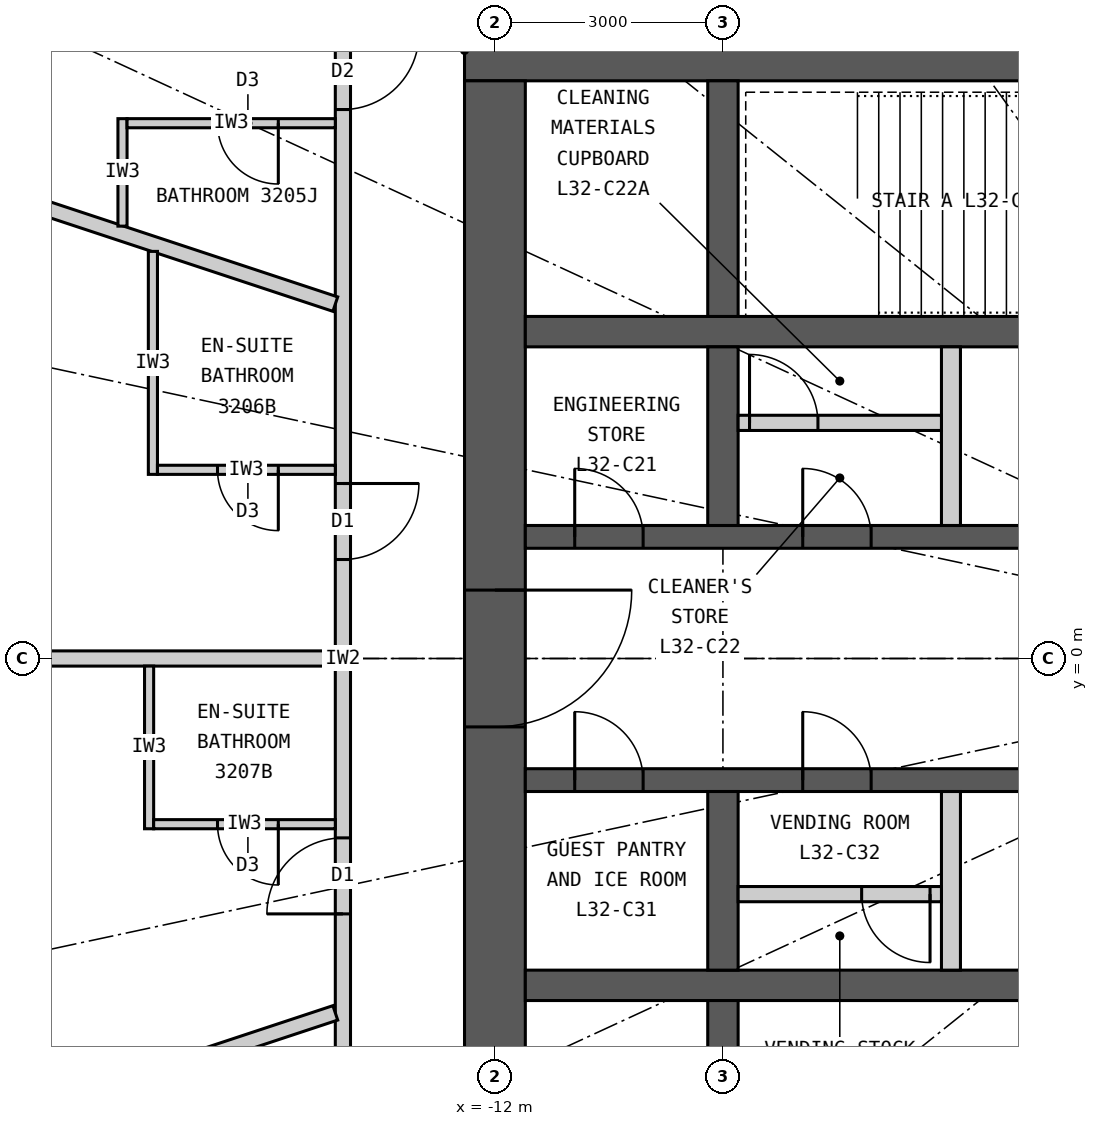
"""IFC4 building model, lengths in metres.
Left out: names, types, materials, properties, quantities, classifications, styles, units other than length and angle.
Written with IfcOpenShell. Run it as: python <this file> out.ifc"""

import sys

from ifc_helpers import new_model, si_unit, direction, frame, frame_2d, origin, place, context, subcontext, project, spatial, rectangle, extrude, element, fill, save


model = new_model("IFC4")
c1 = context("Model", 3, precision=1e-05, world=origin(), true_north=direction((0.0, 1.0)))
c2 = subcontext(c1, "Body", "Model", "MODEL_VIEW")
j1 = project(units=[si_unit("LENGTHUNIT", "METRE"), si_unit("PLANEANGLEUNIT", "RADIAN")], contexts=[c1])
p1 = place(None, origin())
s1 = spatial("IfcSite", under=j1, at=p1, CompositionType="ELEMENT")
p2 = place(p1, origin())
s2 = spatial("IfcBuilding", under=s1, at=p2, CompositionType="ELEMENT")
p3 = place(p2, frame((0.0, 0.0, 125.4)))
s3 = spatial("IfcBuildingStorey", under=s2, at=p3, CompositionType="ELEMENT", Elevation=125.4)
p4 = place(p3, frame((-12.4, 8.0, 0.0), z_axis=(0.0, 0.0, 1.0), x_axis=(1.0, 0.0, 0.0)))
e1 = element("IfcWall", 1, at=p4, inside=s3, PredefinedType="SHEAR", context=c2, shape_type="SweptSolid", body=[
    extrude(rectangle(XDim=24.8, YDim=0.8, at=frame_2d((12.4, 0.0))), origin(), (0.0, 0.0, 1.0), 3.3),
])
p5 = place(p4, frame((11.1, 0.0, 0.0)))
e2 = element("IfcOpeningElement", 2, at=p5, cuts=e1, PredefinedType="OPENING", context=c2, shape_type="SweptSolid", body=[
    extrude(rectangle(XDim=1.2, YDim=2.2, at=frame_2d((0.6, 1.1))), frame((0.0, 0.41, 0.0), z_axis=(0.0, -1.0, 0.0), x_axis=(1.0, 0.0, 0.0)), (0.0, 0.0, 1.0), 0.82),
])
p6 = place(p4, frame((18.7, 0.0, 0.0)))
e3 = element("IfcOpeningElement", 3, at=p6, cuts=e1, PredefinedType="OPENING", context=c2, shape_type="SweptSolid", body=[
    extrude(rectangle(XDim=0.9, YDim=2.2, at=frame_2d((0.45, 1.1))), frame((0.0, 0.41, 0.0), z_axis=(0.0, -1.0, 0.0), x_axis=(1.0, 0.0, 0.0)), (0.0, 0.0, 1.0), 0.82),
])
p7 = place(p3, frame((-12.0, 7.6, 0.0), z_axis=(0.0, 0.0, 1.0), x_axis=(0.0, -1.0, 0.0)))
e4 = element("IfcWall", 4, at=p7, inside=s3, PredefinedType="SHEAR", context=c2, shape_type="SweptSolid", body=[
    extrude(rectangle(XDim=15.2, YDim=0.8, at=frame_2d((7.6, 0.0))), origin(), (0.0, 0.0, 1.0), 3.3),
])
p8 = place(p7, frame((6.7, 0.0, 0.0)))
e5 = element("IfcOpeningElement", 5, at=p8, cuts=e4, PredefinedType="OPENING", context=c2, shape_type="SweptSolid", body=[
    extrude(rectangle(XDim=1.8, YDim=2.2, at=frame_2d((0.9, 1.1))), frame((0.0, 0.41, 0.0), z_axis=(0.0, -1.0, 0.0), x_axis=(1.0, 0.0, 0.0)), (0.0, 0.0, 1.0), 0.82),
])
p9 = place(p3, frame((-11.6, 4.3, 0.0), z_axis=(0.0, 0.0, 1.0), x_axis=(1.0, 0.0, 0.0)))
e6 = element("IfcWall", 6, at=p9, inside=s3, PredefinedType="SHEAR", context=c2, shape_type="SweptSolid", body=[
    extrude(rectangle(XDim=23.2, YDim=0.4, at=frame_2d((11.6, 0.0))), origin(), (0.0, 0.0, 1.0), 3.3),
])
p10 = place(p3, frame((-11.6, 1.6, 0.0), z_axis=(0.0, 0.0, 1.0), x_axis=(1.0, 0.0, 0.0)))
e7 = element("IfcWall", 7, at=p10, inside=s3, PredefinedType="SHEAR", context=c2, shape_type="SweptSolid", body=[
    extrude(rectangle(XDim=23.2, YDim=0.3, at=frame_2d((11.6, 0.0))), origin(), (0.0, 0.0, 1.0), 3.3),
])
p11 = place(p10, frame((6.55, 0.0, 0.0)))
e8 = element("IfcOpeningElement", 8, at=p11, cuts=e7, PredefinedType="OPENING", context=c2, shape_type="SweptSolid", body=[
    extrude(rectangle(XDim=1.1, YDim=2.2, at=frame_2d((0.55, 1.1))), frame((0.0, 0.16, 0.0), z_axis=(0.0, -1.0, 0.0), x_axis=(1.0, 0.0, 0.0)), (0.0, 0.0, 1.0), 0.32),
])
p12 = place(p10, frame((0.65, 0.0, 0.0)))
e9 = element("IfcOpeningElement", 9, at=p12, cuts=e7, PredefinedType="OPENING", context=c2, shape_type="SweptSolid", body=[
    extrude(rectangle(XDim=0.9, YDim=2.2, at=frame_2d((0.45, 1.1))), frame((0.0, 0.16, 0.0), z_axis=(0.0, -1.0, 0.0), x_axis=(1.0, 0.0, 0.0)), (0.0, 0.0, 1.0), 0.32),
])
p13 = place(p10, frame((3.65, 0.0, 0.0)))
e10 = element("IfcOpeningElement", 10, at=p13, cuts=e7, PredefinedType="OPENING", context=c2, shape_type="SweptSolid", body=[
    extrude(rectangle(XDim=0.9, YDim=2.2, at=frame_2d((0.45, 1.1))), frame((0.0, 0.16, 0.0), z_axis=(0.0, -1.0, 0.0), x_axis=(1.0, 0.0, 0.0)), (0.0, 0.0, 1.0), 0.32),
])
p14 = place(p10, frame((21.65, 0.0, 0.0)))
e11 = element("IfcOpeningElement", 11, at=p14, cuts=e7, PredefinedType="OPENING", context=c2, shape_type="SweptSolid", body=[
    extrude(rectangle(XDim=0.9, YDim=2.2, at=frame_2d((0.45, 1.1))), frame((0.0, 0.16, 0.0), z_axis=(0.0, -1.0, 0.0), x_axis=(1.0, 0.0, 0.0)), (0.0, 0.0, 1.0), 0.32),
])
p15 = place(p3, frame((-11.6, -4.3, 0.0), z_axis=(0.0, 0.0, 1.0), x_axis=(1.0, 0.0, 0.0)))
e12 = element("IfcWall", 12, at=p15, inside=s3, PredefinedType="SHEAR", context=c2, shape_type="SweptSolid", body=[
    extrude(rectangle(XDim=23.2, YDim=0.4, at=frame_2d((11.6, 0.0))), origin(), (0.0, 0.0, 1.0), 3.3),
])
p16 = place(p3, frame((-11.6, -1.6, 0.0), z_axis=(0.0, 0.0, 1.0), x_axis=(1.0, 0.0, 0.0)))
e13 = element("IfcWall", 13, at=p16, inside=s3, PredefinedType="SHEAR", context=c2, shape_type="SweptSolid", body=[
    extrude(rectangle(XDim=23.2, YDim=0.3, at=frame_2d((11.6, 0.0))), origin(), (0.0, 0.0, 1.0), 3.3),
])
p17 = place(p16, frame((6.55, 0.0, 0.0)))
e14 = element("IfcOpeningElement", 14, at=p17, cuts=e13, PredefinedType="OPENING", context=c2, shape_type="SweptSolid", body=[
    extrude(rectangle(XDim=1.1, YDim=2.2, at=frame_2d((0.55, 1.1))), frame((0.0, 0.16, 0.0), z_axis=(0.0, -1.0, 0.0), x_axis=(1.0, 0.0, 0.0)), (0.0, 0.0, 1.0), 0.32),
])
p18 = place(p16, frame((15.3, 0.0, 0.0)))
e15 = element("IfcOpeningElement", 15, at=p18, cuts=e13, PredefinedType="OPENING", context=c2, shape_type="SweptSolid", body=[
    extrude(rectangle(XDim=1.6, YDim=2.4, at=frame_2d((0.8, 1.2))), frame((0.0, 0.16, 0.0), z_axis=(0.0, -1.0, 0.0), x_axis=(1.0, 0.0, 0.0)), (0.0, 0.0, 1.0), 0.32),
])
p19 = place(p16, frame((0.65, 0.0, 0.0)))
e16 = element("IfcOpeningElement", 16, at=p19, cuts=e13, PredefinedType="OPENING", context=c2, shape_type="SweptSolid", body=[
    extrude(rectangle(XDim=0.9, YDim=2.2, at=frame_2d((0.45, 1.1))), frame((0.0, 0.16, 0.0), z_axis=(0.0, -1.0, 0.0), x_axis=(1.0, 0.0, 0.0)), (0.0, 0.0, 1.0), 0.32),
])
p20 = place(p16, frame((3.65, 0.0, 0.0)))
e17 = element("IfcOpeningElement", 17, at=p20, cuts=e13, PredefinedType="OPENING", context=c2, shape_type="SweptSolid", body=[
    extrude(rectangle(XDim=0.9, YDim=2.2, at=frame_2d((0.45, 1.1))), frame((0.0, 0.16, 0.0), z_axis=(0.0, -1.0, 0.0), x_axis=(1.0, 0.0, 0.0)), (0.0, 0.0, 1.0), 0.32),
])
p21 = place(p16, frame((21.65, 0.0, 0.0)))
e18 = element("IfcOpeningElement", 18, at=p21, cuts=e13, PredefinedType="OPENING", context=c2, shape_type="SweptSolid", body=[
    extrude(rectangle(XDim=0.9, YDim=2.2, at=frame_2d((0.45, 1.1))), frame((0.0, 0.16, 0.0), z_axis=(0.0, -1.0, 0.0), x_axis=(1.0, 0.0, 0.0)), (0.0, 0.0, 1.0), 0.32),
])
p22 = place(p3, frame((-9.0, 4.5, 0.0), z_axis=(0.0, 0.0, 1.0), x_axis=(0.0, 1.0, 0.0)))
e19 = element("IfcWall", 19, at=p22, inside=s3, PredefinedType="SHEAR", context=c2, shape_type="SweptSolid", body=[
    extrude(rectangle(XDim=3.1, YDim=0.4, at=frame_2d((1.55, 0.0))), origin(), (0.0, 0.0, 1.0), 3.3),
])
for number, where, z_axis, x_axis in (
    (20, (-9.0, 1.75, 0.0), (0.0, 0.0, 1.0), (0.0, 1.0, 0.0)),
    (21, (-9.0, -4.1, 0.0), (0.0, 0.0, 1.0), (0.0, 1.0, 0.0)),
):
    element("IfcWall", number, at=place(p3, frame(where, z_axis=z_axis, x_axis=x_axis)), inside=s3, PredefinedType="SHEAR", context=c2, shape_type="SweptSolid", body=[
        extrude(rectangle(XDim=2.35, YDim=0.4, at=frame_2d((1.175, 0.0))), origin(), (0.0, 0.0, 1.0), 3.3),
    ])
p23 = place(p3, frame((-9.0, -7.6, 0.0), z_axis=(0.0, 0.0, 1.0), x_axis=(0.0, 1.0, 0.0)))
e22 = element("IfcWall", 22, at=p23, inside=s3, PredefinedType="SHEAR", context=c2, shape_type="SweptSolid", body=[
    extrude(rectangle(XDim=3.1, YDim=0.4, at=frame_2d((1.55, 0.0))), origin(), (0.0, 0.0, 1.0), 3.3),
])
for number, where, z_axis, x_axis in (
    (23, (-6.0, 1.75, 0.0), (0.0, 0.0, 1.0), (0.0, 1.0, 0.0)),
    (24, (-6.0, -4.1, 0.0), (0.0, 0.0, 1.0), (0.0, 1.0, 0.0)),
):
    element("IfcWall", number, at=place(p3, frame(where, z_axis=z_axis, x_axis=x_axis)), inside=s3, PredefinedType="PARTITIONING", context=c2, shape_type="SweptSolid", body=[
        extrude(rectangle(XDim=2.35, YDim=0.25, at=frame_2d((1.175, 0.0))), origin(), (0.0, 0.0, 1.0), 3.3),
    ])
p24 = place(p3, frame((-14.0, 9.9, 0.0), z_axis=(0.0, 0.0, 1.0), x_axis=(0.0, -1.0, 0.0)))
e25 = element("IfcWall", 25, at=p24, inside=s3, PredefinedType="PARTITIONING", context=c2, shape_type="SweptSolid", body=[
    extrude(rectangle(XDim=19.8, YDim=0.2, at=frame_2d((9.9, 0.0))), origin(), (0.0, 0.0, 1.0), 3.12),
])
p25 = place(p24, frame((1.678, 0.0, 0.0)))
e26 = element("IfcOpeningElement", 26, at=p25, cuts=e25, PredefinedType="OPENING", context=c2, shape_type="SweptSolid", body=[
    extrude(rectangle(XDim=1.0, YDim=2.2, at=frame_2d((0.5, 1.1))), frame((0.0, 0.11, 0.0), z_axis=(0.0, -1.0, 0.0), x_axis=(1.0, 0.0, 0.0)), (0.0, 0.0, 1.0), 0.22),
])
p26 = place(p24, frame((7.598, 0.0, 0.0)))
e27 = element("IfcOpeningElement", 27, at=p26, cuts=e25, PredefinedType="OPENING", context=c2, shape_type="SweptSolid", body=[
    extrude(rectangle(XDim=1.0, YDim=2.2, at=frame_2d((0.5, 1.1))), frame((0.0, 0.11, 0.0), z_axis=(0.0, -1.0, 0.0), x_axis=(1.0, 0.0, 0.0)), (0.0, 0.0, 1.0), 0.22),
])
p27 = place(p24, frame((12.26, 0.0, 0.0)))
e28 = element("IfcOpeningElement", 28, at=p27, cuts=e25, PredefinedType="OPENING", context=c2, shape_type="SweptSolid", body=[
    extrude(rectangle(XDim=1.0, YDim=2.2, at=frame_2d((0.5, 1.1))), frame((0.0, 0.11, 0.0), z_axis=(0.0, -1.0, 0.0), x_axis=(1.0, 0.0, 0.0)), (0.0, 0.0, 1.0), 0.22),
])
p28 = place(p24, frame((16.922, 0.0, 0.0)))
e29 = element("IfcOpeningElement", 29, at=p28, cuts=e25, PredefinedType="OPENING", context=c2, shape_type="SweptSolid", body=[
    extrude(rectangle(XDim=1.0, YDim=2.2, at=frame_2d((0.5, 1.1))), frame((0.0, 0.11, 0.0), z_axis=(0.0, -1.0, 0.0), x_axis=(1.0, 0.0, 0.0)), (0.0, 0.0, 1.0), 0.22),
])
p29 = place(p3, frame((-14.1, 4.662, 0.0), z_axis=(0.0, 0.0, 1.0), x_axis=(-0.949446466373, 0.313928984789, 0.0)))
e30 = element("IfcWall", 30, at=p29, inside=s3, PredefinedType="PARTITIONING", context=c2, shape_type="SweptSolid", body=[
    extrude(rectangle(XDim=8.797, YDim=0.2, at=frame_2d((4.399, 0.0))), origin(), (0.0, 0.0, 1.0), 3.12),
])
p30 = place(p3, frame((-14.1, 0.0, 0.0), z_axis=(0.0, 0.0, 1.0), x_axis=(-1.0, 0.0, 0.0)))
e31 = element("IfcWall", 31, at=p30, inside=s3, PredefinedType="PARTITIONING", context=c2, shape_type="SweptSolid", body=[
    extrude(rectangle(XDim=9.15, YDim=0.2, at=frame_2d((4.575, 0.0))), origin(), (0.0, 0.0, 1.0), 2.32),
])
p31 = place(p3, frame((-14.1, -4.662, 0.0), z_axis=(0.0, 0.0, 1.0), x_axis=(-0.949446466373, -0.313928984789, 0.0)))
e32 = element("IfcWall", 32, at=p31, inside=s3, PredefinedType="PARTITIONING", context=c2, shape_type="SweptSolid", body=[
    extrude(rectangle(XDim=8.797, YDim=0.2, at=frame_2d((4.399, 0.0))), origin(), (0.0, 0.0, 1.0), 3.12),
])
p32 = place(p3, frame((-16.9, 5.688, 0.0), z_axis=(0.0, 0.0, 1.0), x_axis=(0.0, 1.0, 0.0)))
e33 = element("IfcWall", 33, at=p32, inside=s3, PredefinedType="PARTITIONING", context=c2, shape_type="SweptSolid", body=[
    extrude(rectangle(XDim=1.414, YDim=0.12, at=frame_2d((0.707, 0.0))), origin(), (0.0, 0.0, 1.0), 3.12),
])
p33 = place(p3, frame((-14.1, 7.042, 0.0), z_axis=(0.0, 0.0, 1.0), x_axis=(-1.0, 0.0, 0.0)))
e34 = element("IfcWall", 34, at=p33, inside=s3, PredefinedType="PARTITIONING", context=c2, shape_type="SweptSolid", body=[
    extrude(rectangle(XDim=2.74, YDim=0.12, at=frame_2d((1.37, 0.0))), origin(), (0.0, 0.0, 1.0), 3.12),
])
p34 = place(p33, frame((0.75, 0.0, 0.0)))
e35 = element("IfcOpeningElement", 35, at=p34, cuts=e34, PredefinedType="OPENING", context=c2, shape_type="SweptSolid", body=[
    extrude(rectangle(XDim=0.8, YDim=2.1, at=frame_2d((0.4, 1.05))), frame((0.0, 0.07, 0.0), z_axis=(0.0, -1.0, 0.0), x_axis=(1.0, 0.0, 0.0)), (0.0, 0.0, 1.0), 0.14),
])
p35 = place(p3, frame((-16.5, 5.356, 0.0), z_axis=(0.0, 0.0, 1.0), x_axis=(0.0, -1.0, 0.0)))
e36 = element("IfcWall", 36, at=p35, inside=s3, PredefinedType="PARTITIONING", context=c2, shape_type="SweptSolid", body=[
    extrude(rectangle(XDim=2.934, YDim=0.12, at=frame_2d((1.467, 0.0))), origin(), (0.0, 0.0, 1.0), 3.12),
])
p36 = place(p3, frame((-14.1, 2.482, 0.0), z_axis=(0.0, 0.0, 1.0), x_axis=(-1.0, 0.0, 0.0)))
e37 = element("IfcWall", 37, at=p36, inside=s3, PredefinedType="PARTITIONING", context=c2, shape_type="SweptSolid", body=[
    extrude(rectangle(XDim=2.34, YDim=0.12, at=frame_2d((1.17, 0.0))), origin(), (0.0, 0.0, 1.0), 3.12),
])
p37 = place(p36, frame((0.75, 0.0, 0.0)))
e38 = element("IfcOpeningElement", 38, at=p37, cuts=e37, PredefinedType="OPENING", context=c2, shape_type="SweptSolid", body=[
    extrude(rectangle(XDim=0.8, YDim=2.1, at=frame_2d((0.4, 1.05))), frame((0.0, 0.07, 0.0), z_axis=(0.0, -1.0, 0.0), x_axis=(1.0, 0.0, 0.0)), (0.0, 0.0, 1.0), 0.14),
])
p38 = place(p3, frame((-16.55, -0.1, 0.0), z_axis=(0.0, 0.0, 1.0), x_axis=(0.0, -1.0, 0.0)))
e39 = element("IfcWall", 39, at=p38, inside=s3, PredefinedType="PARTITIONING", context=c2, shape_type="SweptSolid", body=[
    extrude(rectangle(XDim=2.14, YDim=0.12, at=frame_2d((1.07, 0.0))), origin(), (0.0, 0.0, 1.0), 3.12),
])
p39 = place(p3, frame((-14.1, -2.18, 0.0), z_axis=(0.0, 0.0, 1.0), x_axis=(-1.0, 0.0, 0.0)))
e40 = element("IfcWall", 40, at=p39, inside=s3, PredefinedType="PARTITIONING", context=c2, shape_type="SweptSolid", body=[
    extrude(rectangle(XDim=2.39, YDim=0.12, at=frame_2d((1.195, 0.0))), origin(), (0.0, 0.0, 1.0), 3.12),
])
p40 = place(p39, frame((0.75, 0.0, 0.0)))
e41 = element("IfcOpeningElement", 41, at=p40, cuts=e40, PredefinedType="OPENING", context=c2, shape_type="SweptSolid", body=[
    extrude(rectangle(XDim=0.8, YDim=2.1, at=frame_2d((0.4, 1.05))), frame((0.0, 0.07, 0.0), z_axis=(0.0, -1.0, 0.0), x_axis=(1.0, 0.0, 0.0)), (0.0, 0.0, 1.0), 0.14),
])
p41 = place(p3, frame((-8.8, 3.1, 0.0), z_axis=(0.0, 0.0, 1.0), x_axis=(1.0, 0.0, 0.0)))
e42 = element("IfcWall", 42, at=p41, inside=s3, PredefinedType="PARTITIONING", context=c2, shape_type="SweptSolid", body=[
    extrude(rectangle(XDim=2.675, YDim=0.2, at=frame_2d((1.337, 0.0))), origin(), (0.0, 0.0, 1.0), 3.12),
])
p42 = place(p41, frame((0.15, 0.0, 0.0)))
e43 = element("IfcOpeningElement", 43, at=p42, cuts=e42, PredefinedType="OPENING", context=c2, shape_type="SweptSolid", body=[
    extrude(rectangle(XDim=0.9, YDim=2.2, at=frame_2d((0.45, 1.1))), frame((0.0, 0.11, 0.0), z_axis=(0.0, -1.0, 0.0), x_axis=(1.0, 0.0, 0.0)), (0.0, 0.0, 1.0), 0.22),
])
p43 = place(p3, frame((-8.8, -3.1, 0.0), z_axis=(0.0, 0.0, 1.0), x_axis=(1.0, 0.0, 0.0)))
e44 = element("IfcWall", 44, at=p43, inside=s3, PredefinedType="PARTITIONING", context=c2, shape_type="SweptSolid", body=[
    extrude(rectangle(XDim=2.675, YDim=0.2, at=frame_2d((1.337, 0.0))), origin(), (0.0, 0.0, 1.0), 3.12),
])
p44 = place(p43, frame((1.625, 0.0, 0.0)))
e45 = element("IfcOpeningElement", 45, at=p44, cuts=e44, PredefinedType="OPENING", context=c2, shape_type="SweptSolid", body=[
    extrude(rectangle(XDim=0.9, YDim=2.2, at=frame_2d((0.45, 1.1))), frame((0.0, 0.11, 0.0), z_axis=(0.0, -1.0, 0.0), x_axis=(1.0, 0.0, 0.0)), (0.0, 0.0, 1.0), 0.22),
])
p45 = place(p34, origin())
e46 = element("IfcDoor", 46, at=p45, inside=s3, OperationType="SINGLE_SWING_LEFT", PredefinedType="DOOR", context=c2, shape_type="SweptSolid", body=[
    extrude(rectangle(XDim=0.8, YDim=2.1, at=frame_2d((0.4, 1.05))), frame((0.0, 0.025, 0.0), z_axis=(0.0, -1.0, 0.0), x_axis=(1.0, 0.0, 0.0)), (0.0, 0.0, 1.0), 0.05),
])
fill(e35, e46)
p46 = place(p25, origin())
e47 = element("IfcDoor", 47, at=p46, inside=s3, OperationType="SINGLE_SWING_LEFT", PredefinedType="DOOR", context=c2, shape_type="SweptSolid", body=[
    extrude(rectangle(XDim=1.0, YDim=2.2, at=frame_2d((0.5, 1.1))), frame((0.0, 0.025, 0.0), z_axis=(0.0, -1.0, 0.0), x_axis=(1.0, 0.0, 0.0)), (0.0, 0.0, 1.0), 0.05),
])
fill(e26, e47)
p47 = place(p37, origin())
e48 = element("IfcDoor", 48, at=p47, inside=s3, OperationType="SINGLE_SWING_LEFT", PredefinedType="DOOR", context=c2, shape_type="SweptSolid", body=[
    extrude(rectangle(XDim=0.8, YDim=2.1, at=frame_2d((0.4, 1.05))), frame((0.0, 0.025, 0.0), z_axis=(0.0, -1.0, 0.0), x_axis=(1.0, 0.0, 0.0)), (0.0, 0.0, 1.0), 0.05),
])
fill(e38, e48)
p48 = place(p26, origin())
e49 = element("IfcDoor", 49, at=p48, inside=s3, OperationType="SINGLE_SWING_LEFT", PredefinedType="DOOR", context=c2, shape_type="SweptSolid", body=[
    extrude(rectangle(XDim=1.0, YDim=2.2, at=frame_2d((0.5, 1.1))), frame((0.0, 0.025, 0.0), z_axis=(0.0, -1.0, 0.0), x_axis=(1.0, 0.0, 0.0)), (0.0, 0.0, 1.0), 0.05),
])
fill(e27, e49)
p49 = place(p40, origin())
e50 = element("IfcDoor", 50, at=p49, inside=s3, OperationType="SINGLE_SWING_LEFT", PredefinedType="DOOR", context=c2, shape_type="SweptSolid", body=[
    extrude(rectangle(XDim=0.8, YDim=2.1, at=frame_2d((0.4, 1.05))), frame((0.0, 0.025, 0.0), z_axis=(0.0, -1.0, 0.0), x_axis=(1.0, 0.0, 0.0)), (0.0, 0.0, 1.0), 0.05),
])
fill(e41, e50)
p50 = place(p27, origin())
e51 = element("IfcDoor", 51, at=p50, inside=s3, OperationType="SINGLE_SWING_RIGHT", PredefinedType="DOOR", context=c2, shape_type="SweptSolid", body=[
    extrude(rectangle(XDim=1.0, YDim=2.2, at=frame_2d((0.5, 1.1))), frame((0.0, 0.025, 0.0), z_axis=(0.0, -1.0, 0.0), x_axis=(1.0, 0.0, 0.0)), (0.0, 0.0, 1.0), 0.05),
])
fill(e28, e51)
p51 = place(p12, origin())
e52 = element("IfcDoor", 52, at=p51, inside=s3, OperationType="SINGLE_SWING_LEFT", PredefinedType="DOOR", context=c2, shape_type="SweptSolid", body=[
    extrude(rectangle(XDim=0.9, YDim=2.2, at=frame_2d((0.45, 1.1))), frame((0.0, 0.025, 0.0), z_axis=(0.0, -1.0, 0.0), x_axis=(1.0, 0.0, 0.0)), (0.0, 0.0, 1.0), 0.05),
])
fill(e9, e52)
p52 = place(p42, origin())
e53 = element("IfcDoor", 53, at=p52, inside=s3, OperationType="SINGLE_SWING_LEFT", PredefinedType="DOOR", context=c2, shape_type="SweptSolid", body=[
    extrude(rectangle(XDim=0.9, YDim=2.2, at=frame_2d((0.45, 1.1))), frame((0.0, 0.025, 0.0), z_axis=(0.0, -1.0, 0.0), x_axis=(1.0, 0.0, 0.0)), (0.0, 0.0, 1.0), 0.05),
])
fill(e43, e53)
p53 = place(p13, origin())
e54 = element("IfcDoor", 54, at=p53, inside=s3, OperationType="SINGLE_SWING_LEFT", PredefinedType="DOOR", context=c2, shape_type="SweptSolid", body=[
    extrude(rectangle(XDim=0.9, YDim=2.2, at=frame_2d((0.45, 1.1))), frame((0.0, 0.025, 0.0), z_axis=(0.0, -1.0, 0.0), x_axis=(1.0, 0.0, 0.0)), (0.0, 0.0, 1.0), 0.05),
])
fill(e10, e54)
p54 = place(p19, origin())
e55 = element("IfcDoor", 55, at=p54, inside=s3, OperationType="SINGLE_SWING_LEFT", PredefinedType="DOOR", context=c2, shape_type="SweptSolid", body=[
    extrude(rectangle(XDim=0.9, YDim=2.2, at=frame_2d((0.45, 1.1))), frame((0.0, 0.025, 0.0), z_axis=(0.0, -1.0, 0.0), x_axis=(1.0, 0.0, 0.0)), (0.0, 0.0, 1.0), 0.05),
])
fill(e16, e55)
p55 = place(p44, origin())
e56 = element("IfcDoor", 56, at=p55, inside=s3, OperationType="SINGLE_SWING_RIGHT", PredefinedType="DOOR", context=c2, shape_type="SweptSolid", body=[
    extrude(rectangle(XDim=0.9, YDim=2.2, at=frame_2d((0.45, 1.1))), frame((0.0, 0.025, 0.0), z_axis=(0.0, -1.0, 0.0), x_axis=(1.0, 0.0, 0.0)), (0.0, 0.0, 1.0), 0.05),
])
fill(e45, e56)
p56 = place(p20, origin())
e57 = element("IfcDoor", 57, at=p56, inside=s3, OperationType="SINGLE_SWING_LEFT", PredefinedType="DOOR", context=c2, shape_type="SweptSolid", body=[
    extrude(rectangle(XDim=0.9, YDim=2.2, at=frame_2d((0.45, 1.1))), frame((0.0, 0.025, 0.0), z_axis=(0.0, -1.0, 0.0), x_axis=(1.0, 0.0, 0.0)), (0.0, 0.0, 1.0), 0.05),
])
fill(e17, e57)
p57 = place(p8, origin())
e58 = element("IfcDoor", 58, at=p57, inside=s3, OperationType="DOUBLE_DOOR_DOUBLE_SWING", PredefinedType="DOOR", context=c2, shape_type="SweptSolid", body=[
    extrude(rectangle(XDim=1.8, YDim=2.2, at=frame_2d((0.9, 1.1))), frame((0.0, 0.025, 0.0), z_axis=(0.0, -1.0, 0.0), x_axis=(1.0, 0.0, 0.0)), (0.0, 0.0, 1.0), 0.05),
])
fill(e5, e58)
save(model, sys.argv[1])
